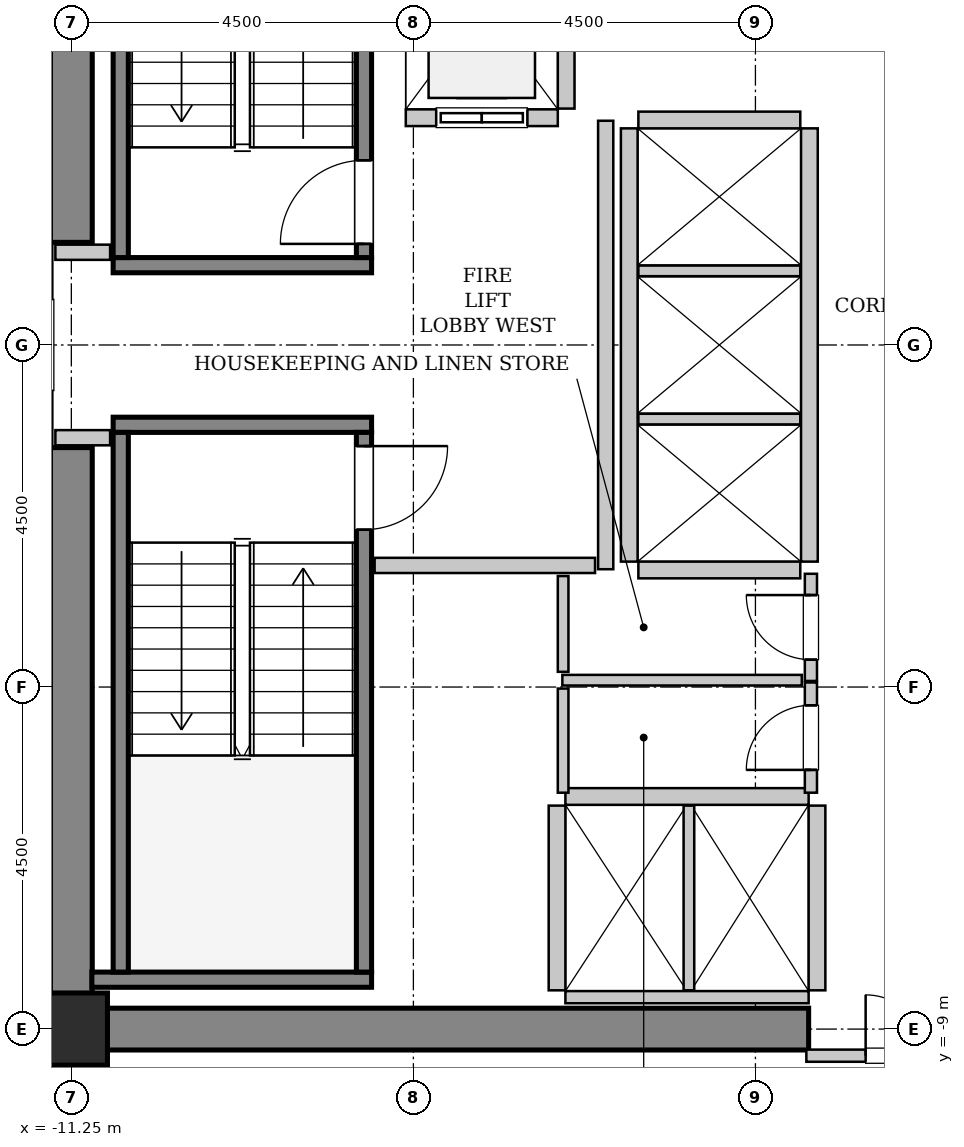
"""IFC4 building model, lengths in metres.
Left out: names, types, materials, properties, quantities, classifications, styles, units other than length and angle.
Written with IfcOpenShell. Run it as: python <this file> out.ifc"""

import sys

from ifc_helpers import new_model, si_unit, direction, frame, frame_2d, origin, origin_2d, place, context, subcontext, project, spatial, rectangle, hollow_rectangle, extrude, source, transform, mapped, element, fill, save


model = new_model("IFC4")
c1 = context("Model", 3, precision=1e-05, world=origin(), true_north=direction((0.0, 1.0)))
c2 = subcontext(c1, "Body", "Model", "MODEL_VIEW")
j1 = project(units=[si_unit("LENGTHUNIT", "METRE"), si_unit("PLANEANGLEUNIT", "RADIAN")], contexts=[c1])
p1 = place(None, origin())
s1 = spatial("IfcSite", under=j1, at=p1, CompositionType="ELEMENT")
p2 = place(p1, origin())
s2 = spatial("IfcBuilding", under=s1, at=p2, CompositionType="ELEMENT")
p3 = place(p2, frame((0.0, 0.0, 106.0)))
s3 = spatial("IfcBuildingStorey", under=s2, at=p3, CompositionType="ELEMENT", Elevation=106.0)
m1 = source(origin(), c2, "Body", "SweptSolid", [
    extrude(rectangle(XDim=9.975, YDim=0.55, at=frame_2d((4.987, 0.0))), origin(), (0.0, 0.0, 1.0), 3.8),
])
p4 = place(p3, frame((-11.525, -9.0, 0.0), z_axis=(0.0, 0.0, 1.0), x_axis=(1.0, 0.0, 0.0)))
e1 = element("IfcWall", 1, at=p4, inside=s3, PredefinedType="SHEAR", context=c2, shape_type="MappedRepresentation", body=[
    mapped(m1, transform((0.0, 0.0, 0.0), x_axis=(1.0, 0.0, 0.0), y_axis=(0.0, 1.0, 0.0), z_axis=(0.0, 0.0, 1.0), scale=1.0)),
])
m2 = source(origin(), c2, "Body", "SweptSolid", [
    extrude(rectangle(XDim=7.375, YDim=0.55, at=frame_2d((3.688, 0.0))), origin(), (0.0, 0.0, 1.0), 3.8),
])
for number, where, z_axis, x_axis in (
    (2, (-11.25, -8.725, 0.0), (0.0, 0.0, 1.0), (0.0, 1.0, 0.0)),
    (3, (-11.25, 1.35, 0.0), (0.0, 0.0, 1.0), (0.0, 1.0, 0.0)),
):
    element("IfcWall", number, at=place(p3, frame(where, z_axis=z_axis, x_axis=x_axis)), inside=s3, PredefinedType="SHEAR", context=c2, shape_type="MappedRepresentation", body=[
        mapped(m2, transform((0.0, 0.0, 0.0), x_axis=(1.0, 0.0, 0.0), y_axis=(0.0, 1.0, 0.0), z_axis=(0.0, 0.0, 1.0), scale=1.0)),
    ])
m3 = source(origin(), c2, "Body", "SweptSolid", [
    extrude(hollow_rectangle(XDim=0.95, YDim=0.95, WallThickness=0.045, InnerFilletRadius=0.045, OuterFilletRadius=0.09, at=origin_2d()), origin(), (0.0, 0.0, 1.0), 3.8),
])
p5 = place(p3, frame((-11.25, -9.0, 0.0), z_axis=(0.0, 0.0, 1.0), x_axis=(1.0, 0.0, 0.0)))
e4 = element("IfcColumn", 4, at=p5, inside=s3, PredefinedType="COLUMN", context=c2, shape_type="MappedRepresentation", body=[
    mapped(m3, transform((0.0, 0.0, 0.0), x_axis=(1.0, 0.0, 0.0), y_axis=(0.0, 1.0, 0.0), z_axis=(0.0, 0.0, 1.0), scale=1.0)),
])
m4 = source(origin(), c2, "Body", "SweptSolid", [
    extrude(rectangle(XDim=3.4, YDim=0.2, at=frame_2d((1.7, 0.0))), origin(), (0.0, 0.0, 1.0), 3.8),
])
p6 = place(p3, frame((-7.3, 1.05, 0.0), z_axis=(0.0, 0.0, 1.0), x_axis=(-1.0, 0.0, 0.0)))
e5 = element("IfcWall", 5, at=p6, inside=s3, PredefinedType="SOLIDWALL", context=c2, shape_type="MappedRepresentation", body=[
    mapped(m4, transform((0.0, 0.0, 0.0), x_axis=(1.0, 0.0, 0.0), y_axis=(0.0, 1.0, 0.0), z_axis=(0.0, 0.0, 1.0), scale=1.0)),
])
m5 = source(origin(), c2, "Body", "SweptSolid", [
    extrude(rectangle(XDim=7.1, YDim=0.2, at=frame_2d((3.55, 0.0))), origin(), (0.0, 0.0, 1.0), 3.8),
])
p7 = place(p3, frame((-7.4, 1.15, 0.0), z_axis=(0.0, 0.0, 1.0), x_axis=(0.0, 1.0, 0.0)))
e6 = element("IfcWall", 6, at=p7, inside=s3, PredefinedType="SOLIDWALL", context=c2, shape_type="MappedRepresentation", body=[
    mapped(m5, transform((0.0, 0.0, 0.0), x_axis=(1.0, 0.0, 0.0), y_axis=(0.0, 1.0, 0.0), z_axis=(0.0, 0.0, 1.0), scale=1.0)),
])
p8 = place(p7, frame((0.18, 0.0, 0.0)))
e7 = element("IfcOpeningElement", 7, at=p8, cuts=e6, PredefinedType="OPENING", context=c2, shape_type="SweptSolid", body=[
    extrude(rectangle(XDim=1.1, YDim=2.15, at=frame_2d((0.55, 1.075))), frame((0.0, 0.11, 0.0), z_axis=(0.0, -1.0, 0.0), x_axis=(1.0, 0.0, 0.0)), (0.0, 0.0, 1.0), 0.22),
])
p9 = place(p3, frame((-10.6, 1.15, 0.0), z_axis=(0.0, 0.0, 1.0), x_axis=(0.0, 1.0, 0.0)))
e8 = element("IfcWall", 8, at=p9, inside=s3, PredefinedType="SOLIDWALL", context=c2, shape_type="MappedRepresentation", body=[
    mapped(m5, transform((0.0, 0.0, 0.0), x_axis=(1.0, 0.0, 0.0), y_axis=(0.0, 1.0, 0.0), z_axis=(0.0, 0.0, 1.0), scale=1.0)),
])
p10 = place(p3, frame((-10.7, -1.05, 0.0), z_axis=(0.0, 0.0, 1.0), x_axis=(1.0, 0.0, 0.0)))
e9 = element("IfcWall", 9, at=p10, inside=s3, PredefinedType="SOLIDWALL", context=c2, shape_type="MappedRepresentation", body=[
    mapped(m4, transform((0.0, 0.0, 0.0), x_axis=(1.0, 0.0, 0.0), y_axis=(0.0, 1.0, 0.0), z_axis=(0.0, 0.0, 1.0), scale=1.0)),
])
m6 = source(origin(), c2, "Body", "SweptSolid", [
    extrude(rectangle(XDim=3.68, YDim=0.2, at=frame_2d((1.84, 0.0))), origin(), (0.0, 0.0, 1.0), 3.8),
])
p11 = place(p3, frame((-10.98, -8.35, 0.0), z_axis=(0.0, 0.0, 1.0), x_axis=(1.0, 0.0, 0.0)))
e10 = element("IfcWall", 10, at=p11, inside=s3, PredefinedType="SOLIDWALL", context=c2, shape_type="MappedRepresentation", body=[
    mapped(m6, transform((0.0, 0.0, 0.0), x_axis=(1.0, 0.0, 0.0), y_axis=(0.0, 1.0, 0.0), z_axis=(0.0, 0.0, 1.0), scale=1.0)),
])
p12 = place(p3, frame((-10.6, -1.15, 0.0), z_axis=(0.0, 0.0, 1.0), x_axis=(0.0, -1.0, 0.0)))
e11 = element("IfcWall", 11, at=p12, inside=s3, PredefinedType="SOLIDWALL", context=c2, shape_type="MappedRepresentation", body=[
    mapped(m5, transform((0.0, 0.0, 0.0), x_axis=(1.0, 0.0, 0.0), y_axis=(0.0, 1.0, 0.0), z_axis=(0.0, 0.0, 1.0), scale=1.0)),
])
p13 = place(p3, frame((-7.4, -1.15, 0.0), z_axis=(0.0, 0.0, 1.0), x_axis=(0.0, -1.0, 0.0)))
e12 = element("IfcWall", 12, at=p13, inside=s3, PredefinedType="SOLIDWALL", context=c2, shape_type="MappedRepresentation", body=[
    mapped(m5, transform((0.0, 0.0, 0.0), x_axis=(1.0, 0.0, 0.0), y_axis=(0.0, 1.0, 0.0), z_axis=(0.0, 0.0, 1.0), scale=1.0)),
])
p14 = place(p13, frame((0.18, 0.0, 0.0)))
e13 = element("IfcOpeningElement", 13, at=p14, cuts=e12, PredefinedType="OPENING", context=c2, shape_type="SweptSolid", body=[
    extrude(rectangle(XDim=1.1, YDim=2.15, at=frame_2d((0.55, 1.075))), frame((0.0, 0.11, 0.0), z_axis=(0.0, -1.0, 0.0), x_axis=(1.0, 0.0, 0.0)), (0.0, 0.0, 1.0), 0.22),
])
m7 = source(origin(), c2, "Body", "SweptSolid", [
    extrude(rectangle(XDim=2.0, YDim=0.22, at=frame_2d((1.0, 0.0))), origin(), (0.0, 0.0, 1.0), 3.535),
])
p15 = place(p3, frame((-6.85, 2.99, 0.0), z_axis=(0.0, 0.0, 1.0), x_axis=(1.0, 0.0, 0.0)))
e14 = element("IfcWall", 14, at=p15, inside=s3, PredefinedType="SOLIDWALL", context=c2, shape_type="MappedRepresentation", body=[
    mapped(m7, transform((0.0, 0.0, 0.0), x_axis=(1.0, 0.0, 0.0), y_axis=(0.0, 1.0, 0.0), z_axis=(0.0, 0.0, 1.0), scale=1.0)),
])
p16 = place(p15, frame((0.4, 0.0, 0.0)))
e15 = element("IfcOpeningElement", 15, at=p16, cuts=e14, PredefinedType="OPENING", context=c2, shape_type="SweptSolid", body=[
    extrude(rectangle(XDim=1.2, YDim=2.2, at=frame_2d((0.6, 1.1))), frame((0.0, 0.12, 0.0), z_axis=(0.0, -1.0, 0.0), x_axis=(1.0, 0.0, 0.0)), (0.0, 0.0, 1.0), 0.24),
])
m8 = source(origin(), c2, "Body", "SweptSolid", [
    extrude(rectangle(XDim=2.68, YDim=0.22, at=frame_2d((1.34, 0.0))), origin(), (0.0, 0.0, 1.0), 3.535),
])
p17 = place(p3, frame((-4.74, 3.11, 0.0), z_axis=(0.0, 0.0, 1.0), x_axis=(0.0, 1.0, 0.0)))
e16 = element("IfcWall", 16, at=p17, inside=s3, PredefinedType="SOLIDWALL", context=c2, shape_type="MappedRepresentation", body=[
    mapped(m8, transform((0.0, 0.0, 0.0), x_axis=(1.0, 0.0, 0.0), y_axis=(0.0, 1.0, 0.0), z_axis=(0.0, 0.0, 1.0), scale=1.0)),
])
m9 = source(origin(), c2, "Body", "SweptSolid", [
    extrude(rectangle(XDim=3.2, YDim=0.22, at=frame_2d((1.6, 0.0))), origin(), (0.0, 0.0, 1.0), 3.535),
])
p18 = place(p3, frame((-1.55, -5.94, 0.0), z_axis=(0.0, 0.0, 1.0), x_axis=(-1.0, 0.0, 0.0)))
e17 = element("IfcWall", 17, at=p18, inside=s3, PredefinedType="SOLIDWALL", context=c2, shape_type="MappedRepresentation", body=[
    mapped(m9, transform((0.0, 0.0, 0.0), x_axis=(1.0, 0.0, 0.0), y_axis=(0.0, 1.0, 0.0), z_axis=(0.0, 0.0, 1.0), scale=1.0)),
])
m10 = source(origin(), c2, "Body", "SweptSolid", [
    extrude(rectangle(XDim=3.2, YDim=0.16, at=frame_2d((1.6, 0.0))), origin(), (0.0, 0.0, 1.0), 2.425),
])
p19 = place(p3, frame((-4.75, -8.58, 0.0), z_axis=(0.0, 0.0, 1.0), x_axis=(1.0, 0.0, 0.0)))
e18 = element("IfcWall", 18, at=p19, inside=s3, PredefinedType="PARTITIONING", context=c2, shape_type="MappedRepresentation", body=[
    mapped(m10, transform((0.0, 0.0, 0.0), x_axis=(1.0, 0.0, 0.0), y_axis=(0.0, 1.0, 0.0), z_axis=(0.0, 0.0, 1.0), scale=1.0)),
])
m11 = source(origin(), c2, "Body", "SweptSolid", [
    extrude(rectangle(XDim=2.43, YDim=0.22, at=frame_2d((1.215, 0.0))), origin(), (0.0, 0.0, 1.0), 3.535),
])
p20 = place(p3, frame((-4.86, -6.06, 0.0), z_axis=(0.0, 0.0, 1.0), x_axis=(0.0, -1.0, 0.0)))
e19 = element("IfcWall", 19, at=p20, inside=s3, PredefinedType="SOLIDWALL", context=c2, shape_type="MappedRepresentation", body=[
    mapped(m11, transform((0.0, 0.0, 0.0), x_axis=(1.0, 0.0, 0.0), y_axis=(0.0, 1.0, 0.0), z_axis=(0.0, 0.0, 1.0), scale=1.0)),
])
m12 = source(origin(), c2, "Body", "SweptSolid", [
    extrude(rectangle(XDim=2.43, YDim=0.14, at=frame_2d((1.215, 0.0))), origin(), (0.0, 0.0, 1.0), 3.535),
])
p21 = place(p3, frame((-3.125, -8.49, 0.0), z_axis=(0.0, 0.0, 1.0), x_axis=(0.0, 1.0, 0.0)))
e20 = element("IfcWall", 20, at=p21, inside=s3, PredefinedType="PARTITIONING", context=c2, shape_type="MappedRepresentation", body=[
    mapped(m12, transform((0.0, 0.0, 0.0), x_axis=(1.0, 0.0, 0.0), y_axis=(0.0, 1.0, 0.0), z_axis=(0.0, 0.0, 1.0), scale=1.0)),
])
p22 = place(p3, frame((-1.44, -8.49, 0.0), z_axis=(0.0, 0.0, 1.0), x_axis=(0.0, 1.0, 0.0)))
e21 = element("IfcWall", 21, at=p22, inside=s3, PredefinedType="SOLIDWALL", context=c2, shape_type="MappedRepresentation", body=[
    mapped(m11, transform((0.0, 0.0, 0.0), x_axis=(1.0, 0.0, 0.0), y_axis=(0.0, 1.0, 0.0), z_axis=(0.0, 0.0, 1.0), scale=1.0)),
])
m13 = source(origin(), c2, "Body", "SweptSolid", [
    extrude(rectangle(XDim=5.7, YDim=0.22, at=frame_2d((2.85, 0.0))), origin(), (0.0, 0.0, 1.0), 3.535),
])
for number, where, z_axis, x_axis in (
    (22, (-1.54, -2.85, 0.0), (0.0, 0.0, 1.0), (0.0, 1.0, 0.0)),
    (23, (-3.91, 2.85, 0.0), (0.0, 0.0, 1.0), (0.0, -1.0, 0.0)),
):
    element("IfcWall", number, at=place(p3, frame(where, z_axis=z_axis, x_axis=x_axis)), inside=s3, PredefinedType="SOLIDWALL", context=c2, shape_type="MappedRepresentation", body=[
        mapped(m13, transform((0.0, 0.0, 0.0), x_axis=(1.0, 0.0, 0.0), y_axis=(0.0, 1.0, 0.0), z_axis=(0.0, 0.0, 1.0), scale=1.0)),
    ])
m14 = source(origin(), c2, "Body", "SweptSolid", [
    extrude(rectangle(XDim=2.13, YDim=0.22, at=frame_2d((1.065, 0.0))), origin(), (0.0, 0.0, 1.0), 3.535),
])
p23 = place(p3, frame((-3.79, -2.96, 0.0), z_axis=(0.0, 0.0, 1.0), x_axis=(1.0, 0.0, 0.0)))
e24 = element("IfcWall", 24, at=p23, inside=s3, PredefinedType="SOLIDWALL", context=c2, shape_type="MappedRepresentation", body=[
    mapped(m14, transform((0.0, 0.0, 0.0), x_axis=(1.0, 0.0, 0.0), y_axis=(0.0, 1.0, 0.0), z_axis=(0.0, 0.0, 1.0), scale=1.0)),
])
m15 = source(origin(), c2, "Body", "SweptSolid", [
    extrude(rectangle(XDim=2.13, YDim=0.14, at=frame_2d((1.065, 0.0))), origin(), (0.0, 0.0, 1.0), 3.535),
])
for number, where, z_axis, x_axis in (
    (25, (-3.79, -0.975, 0.0), (0.0, 0.0, 1.0), (1.0, 0.0, 0.0)),
    (26, (-3.79, 0.975, 0.0), (0.0, 0.0, 1.0), (1.0, 0.0, 0.0)),
):
    element("IfcWall", number, at=place(p3, frame(where, z_axis=z_axis, x_axis=x_axis)), inside=s3, PredefinedType="PARTITIONING", context=c2, shape_type="MappedRepresentation", body=[
        mapped(m15, transform((0.0, 0.0, 0.0), x_axis=(1.0, 0.0, 0.0), y_axis=(0.0, 1.0, 0.0), z_axis=(0.0, 0.0, 1.0), scale=1.0)),
    ])
p24 = place(p3, frame((-1.66, 2.96, 0.0), z_axis=(0.0, 0.0, 1.0), x_axis=(-1.0, 0.0, 0.0)))
e27 = element("IfcWall", 27, at=p24, inside=s3, PredefinedType="SOLIDWALL", context=c2, shape_type="MappedRepresentation", body=[
    mapped(m14, transform((0.0, 0.0, 0.0), x_axis=(1.0, 0.0, 0.0), y_axis=(0.0, 1.0, 0.0), z_axis=(0.0, 0.0, 1.0), scale=1.0)),
])
m16 = source(origin(), c2, "Body", "SweptSolid", [
    extrude(rectangle(XDim=5.9, YDim=0.2, at=frame_2d((2.95, 0.0))), origin(), (0.0, 0.0, 1.0), 3.535),
])
p25 = place(p3, frame((-4.22, -2.95, 0.0), z_axis=(0.0, 0.0, 1.0), x_axis=(0.0, 1.0, 0.0)))
e28 = element("IfcWall", 28, at=p25, inside=s3, PredefinedType="PARTITIONING", context=c2, shape_type="MappedRepresentation", body=[
    mapped(m16, transform((0.0, 0.0, 0.0), x_axis=(1.0, 0.0, 0.0), y_axis=(0.0, 1.0, 0.0), z_axis=(0.0, 0.0, 1.0), scale=1.0)),
])
m17 = source(origin(), c2, "Body", "SweptSolid", [
    extrude(rectangle(XDim=2.9, YDim=0.2, at=frame_2d((1.45, 0.0))), origin(), (0.0, 0.0, 1.0), 3.535),
])
p26 = place(p3, frame((-7.26, -2.9, 0.0), z_axis=(0.0, 0.0, 1.0), x_axis=(1.0, 0.0, 0.0)))
e29 = element("IfcWall", 29, at=p26, inside=s3, PredefinedType="PARTITIONING", context=c2, shape_type="MappedRepresentation", body=[
    mapped(m17, transform((0.0, 0.0, 0.0), x_axis=(1.0, 0.0, 0.0), y_axis=(0.0, 1.0, 0.0), z_axis=(0.0, 0.0, 1.0), scale=1.0)),
])
m18 = source(origin(), c2, "Body", "SweptSolid", [
    extrude(rectangle(XDim=0.72, YDim=0.2, at=frame_2d((0.36, 0.0))), origin(), (0.0, 0.0, 1.0), 3.535),
])
for number, where, z_axis, x_axis in (
    (30, (-11.46, 1.22, 0.0), (0.0, 0.0, 1.0), (1.0, 0.0, 0.0)),
    (31, (-11.46, -1.22, 0.0), (0.0, 0.0, 1.0), (1.0, 0.0, 0.0)),
):
    element("IfcWall", number, at=place(p3, frame(where, z_axis=z_axis, x_axis=x_axis)), inside=s3, PredefinedType="PARTITIONING", context=c2, shape_type="MappedRepresentation", body=[
        mapped(m18, transform((0.0, 0.0, 0.0), x_axis=(1.0, 0.0, 0.0), y_axis=(0.0, 1.0, 0.0), z_axis=(0.0, 0.0, 1.0), scale=1.0)),
    ])
m19 = source(origin(), c2, "Body", "SweptSolid", [
    extrude(rectangle(XDim=3.16, YDim=0.16, at=frame_2d((1.58, 0.0))), origin(), (0.0, 0.0, 1.0), 2.425),
])
p27 = place(p3, frame((-1.58, -9.35, 0.0), z_axis=(0.0, 0.0, 1.0), x_axis=(1.0, 0.0, 0.0)))
e32 = element("IfcWall", 32, at=p27, inside=s3, PredefinedType="PARTITIONING", context=c2, shape_type="MappedRepresentation", body=[
    mapped(m19, transform((0.0, 0.0, 0.0), x_axis=(1.0, 0.0, 0.0), y_axis=(0.0, 1.0, 0.0), z_axis=(0.0, 0.0, 1.0), scale=1.0)),
])
p28 = place(p27, frame((0.78, 0.0, 0.0)))
e33 = element("IfcOpeningElement", 33, at=p28, cuts=e32, PredefinedType="OPENING", context=c2, shape_type="SweptSolid", body=[
    extrude(rectangle(XDim=1.6, YDim=2.3, at=frame_2d((0.8, 1.15))), frame((0.0, 0.09, 0.0), z_axis=(0.0, -1.0, 0.0), x_axis=(1.0, 0.0, 0.0)), (0.0, 0.0, 1.0), 0.18),
])
m20 = source(origin(), c2, "Body", "SweptSolid", [
    extrude(rectangle(XDim=1.41, YDim=0.16, at=frame_2d((0.705, 0.0))), origin(), (0.0, 0.0, 1.0), 3.535),
])
p29 = place(p3, frame((-1.52, -4.42, 0.0), z_axis=(0.0, 0.0, 1.0), x_axis=(0.0, 1.0, 0.0)))
e34 = element("IfcWall", 34, at=p29, inside=s3, PredefinedType="PARTITIONING", context=c2, shape_type="MappedRepresentation", body=[
    mapped(m20, transform((0.0, 0.0, 0.0), x_axis=(1.0, 0.0, 0.0), y_axis=(0.0, 1.0, 0.0), z_axis=(0.0, 0.0, 1.0), scale=1.0)),
])
p30 = place(p29, frame((0.28, 0.0, 0.0)))
e35 = element("IfcOpeningElement", 35, at=p30, cuts=e34, PredefinedType="OPENING", context=c2, shape_type="SweptSolid", body=[
    extrude(rectangle(XDim=0.85, YDim=2.1, at=frame_2d((0.425, 1.05))), frame((0.0, 0.09, 0.0), z_axis=(0.0, -1.0, 0.0), x_axis=(1.0, 0.0, 0.0)), (0.0, 0.0, 1.0), 0.18),
])
m21 = source(origin(), c2, "Body", "SweptSolid", [
    extrude(rectangle(XDim=3.15, YDim=0.14, at=frame_2d((1.575, 0.0))), origin(), (0.0, 0.0, 1.0), 3.535),
])
p31 = place(p3, frame((-4.79, -4.41, 0.0), z_axis=(0.0, 0.0, 1.0), x_axis=(1.0, 0.0, 0.0)))
e36 = element("IfcWall", 36, at=p31, inside=s3, PredefinedType="PARTITIONING", context=c2, shape_type="MappedRepresentation", body=[
    mapped(m21, transform((0.0, 0.0, 0.0), x_axis=(1.0, 0.0, 0.0), y_axis=(0.0, 1.0, 0.0), z_axis=(0.0, 0.0, 1.0), scale=1.0)),
])
m22 = source(origin(), c2, "Body", "SweptSolid", [
    extrude(rectangle(XDim=1.26, YDim=0.14, at=frame_2d((0.63, 0.0))), origin(), (0.0, 0.0, 1.0), 3.535),
])
p32 = place(p3, frame((-4.78, -4.3, 0.0), z_axis=(0.0, 0.0, 1.0), x_axis=(0.0, 1.0, 0.0)))
e37 = element("IfcWall", 37, at=p32, inside=s3, PredefinedType="PARTITIONING", context=c2, shape_type="MappedRepresentation", body=[
    mapped(m22, transform((0.0, 0.0, 0.0), x_axis=(1.0, 0.0, 0.0), y_axis=(0.0, 1.0, 0.0), z_axis=(0.0, 0.0, 1.0), scale=1.0)),
])
m23 = source(origin(), c2, "Body", "SweptSolid", [
    extrude(rectangle(XDim=1.45, YDim=0.16, at=frame_2d((0.725, 0.0))), origin(), (0.0, 0.0, 1.0), 3.535),
])
p33 = place(p3, frame((-1.52, -5.89, 0.0), z_axis=(0.0, 0.0, 1.0), x_axis=(0.0, 1.0, 0.0)))
e38 = element("IfcWall", 38, at=p33, inside=s3, PredefinedType="PARTITIONING", context=c2, shape_type="MappedRepresentation", body=[
    mapped(m23, transform((0.0, 0.0, 0.0), x_axis=(1.0, 0.0, 0.0), y_axis=(0.0, 1.0, 0.0), z_axis=(0.0, 0.0, 1.0), scale=1.0)),
])
p34 = place(p33, frame((0.3, 0.0, 0.0)))
e39 = element("IfcOpeningElement", 39, at=p34, cuts=e38, PredefinedType="OPENING", context=c2, shape_type="SweptSolid", body=[
    extrude(rectangle(XDim=0.85, YDim=2.1, at=frame_2d((0.425, 1.05))), frame((0.0, 0.09, 0.0), z_axis=(0.0, -1.0, 0.0), x_axis=(1.0, 0.0, 0.0)), (0.0, 0.0, 1.0), 0.18),
])
m24 = source(origin(), c2, "Body", "SweptSolid", [
    extrude(rectangle(XDim=1.37, YDim=0.14, at=frame_2d((0.685, 0.0))), origin(), (0.0, 0.0, 1.0), 3.535),
])
p35 = place(p3, frame((-4.78, -5.89, 0.0), z_axis=(0.0, 0.0, 1.0), x_axis=(0.0, 1.0, 0.0)))
e40 = element("IfcWall", 40, at=p35, inside=s3, PredefinedType="PARTITIONING", context=c2, shape_type="MappedRepresentation", body=[
    mapped(m24, transform((0.0, 0.0, 0.0), x_axis=(1.0, 0.0, 0.0), y_axis=(0.0, 1.0, 0.0), z_axis=(0.0, 0.0, 1.0), scale=1.0)),
])
m25 = source(origin(), c2, "Body", "SweptSolid", [
    extrude(rectangle(XDim=1.1, YDim=2.15, at=frame_2d((0.55, 1.075))), frame((0.0, 0.025, 0.0), z_axis=(0.0, -1.0, 0.0), x_axis=(1.0, 0.0, 0.0)), (0.0, 0.0, 1.0), 0.05),
])
p36 = place(p8, origin())
e41 = element("IfcDoor", 41, at=p36, inside=s3, OperationType="SINGLE_SWING_LEFT", PredefinedType="DOOR", context=c2, shape_type="MappedRepresentation", body=[
    mapped(m25, transform((0.0, 0.0, 0.0), x_axis=(1.0, 0.0, 0.0), y_axis=(0.0, 1.0, 0.0), z_axis=(0.0, 0.0, 1.0), scale=1.0)),
])
fill(e7, e41)
p37 = place(p14, origin())
e42 = element("IfcDoor", 42, at=p37, inside=s3, OperationType="SINGLE_SWING_LEFT", PredefinedType="DOOR", context=c2, shape_type="MappedRepresentation", body=[
    mapped(m25, transform((0.0, 0.0, 0.0), x_axis=(1.0, 0.0, 0.0), y_axis=(0.0, 1.0, 0.0), z_axis=(0.0, 0.0, 1.0), scale=1.0)),
])
fill(e13, e42)
m26 = source(origin(), c2, "Body", "SweptSolid", [
    extrude(rectangle(XDim=1.2, YDim=2.2, at=frame_2d((0.6, 1.1))), frame((0.0, 0.025, 0.0), z_axis=(0.0, -1.0, 0.0), x_axis=(1.0, 0.0, 0.0)), (0.0, 0.0, 1.0), 0.05),
])
p38 = place(p16, origin())
e43 = element("IfcDoor", 43, at=p38, inside=s3, OperationType="SLIDING_TO_LEFT", PredefinedType="DOOR", context=c2, shape_type="MappedRepresentation", body=[
    mapped(m26, transform((0.0, 0.0, 0.0), x_axis=(1.0, 0.0, 0.0), y_axis=(0.0, 1.0, 0.0), z_axis=(0.0, 0.0, 1.0), scale=1.0)),
])
fill(e15, e43)
m27 = source(origin(), c2, "Body", "SweptSolid", [
    extrude(rectangle(XDim=1.6, YDim=2.3, at=frame_2d((0.8, 1.15))), frame((0.0, 0.025, 0.0), z_axis=(0.0, -1.0, 0.0), x_axis=(1.0, 0.0, 0.0)), (0.0, 0.0, 1.0), 0.05),
])
p39 = place(p28, origin())
e44 = element("IfcDoor", 44, at=p39, inside=s3, OperationType="DOUBLE_DOOR_SINGLE_SWING", PredefinedType="DOOR", context=c2, shape_type="MappedRepresentation", body=[
    mapped(m27, transform((0.0, 0.0, 0.0), x_axis=(1.0, 0.0, 0.0), y_axis=(0.0, 1.0, 0.0), z_axis=(0.0, 0.0, 1.0), scale=1.0)),
])
fill(e33, e44)
m28 = source(origin(), c2, "Body", "SweptSolid", [
    extrude(rectangle(XDim=0.85, YDim=2.1, at=frame_2d((0.425, 1.05))), frame((0.0, 0.025, 0.0), z_axis=(0.0, -1.0, 0.0), x_axis=(1.0, 0.0, 0.0)), (0.0, 0.0, 1.0), 0.05),
])
p40 = place(p30, origin())
e45 = element("IfcDoor", 45, at=p40, inside=s3, OperationType="SINGLE_SWING_RIGHT", PredefinedType="DOOR", context=c2, shape_type="MappedRepresentation", body=[
    mapped(m28, transform((0.0, 0.0, 0.0), x_axis=(1.0, 0.0, 0.0), y_axis=(0.0, 1.0, 0.0), z_axis=(0.0, 0.0, 1.0), scale=1.0)),
])
fill(e35, e45)
p41 = place(p34, origin())
e46 = element("IfcDoor", 46, at=p41, inside=s3, OperationType="SINGLE_SWING_LEFT", PredefinedType="DOOR", context=c2, shape_type="MappedRepresentation", body=[
    mapped(m28, transform((0.0, 0.0, 0.0), x_axis=(1.0, 0.0, 0.0), y_axis=(0.0, 1.0, 0.0), z_axis=(0.0, 0.0, 1.0), scale=1.0)),
])
fill(e39, e46)
save(model, sys.argv[1])
